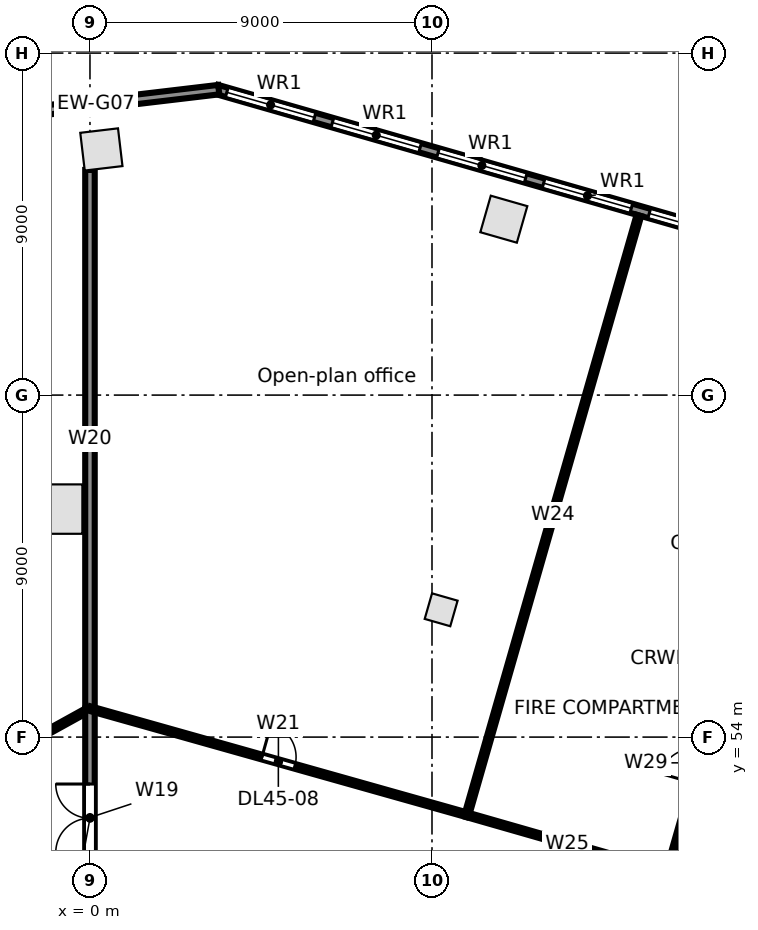
"""IFC4 building model, lengths in metres.
Left out: names, types, materials, properties, quantities, classifications, styles, units other than length and angle.
Written with IfcOpenShell. Run it as: python <this file> out.ifc"""

import sys

from ifc_helpers import new_model, si_unit, direction, frame, frame_2d, origin, origin_2d, place, context, subcontext, project, spatial, rectangle, extrude, element, fill, save


model = new_model("IFC4")
c1 = context("Model", 3, precision=1e-05, world=origin(), true_north=direction((0.0, 1.0)))
c2 = subcontext(c1, "Body", "Model", "MODEL_VIEW")
j1 = project(units=[si_unit("LENGTHUNIT", "METRE"), si_unit("PLANEANGLEUNIT", "RADIAN")], contexts=[c1])
p1 = place(None, origin())
s1 = spatial("IfcSite", under=j1, at=p1, CompositionType="ELEMENT")
p2 = place(p1, origin())
s2 = spatial("IfcBuilding", under=s1, at=p2, CompositionType="ELEMENT")
p3 = place(p2, frame((0.0, 0.0, 211.4)))
s3 = spatial("IfcBuildingStorey", under=s2, at=p3, CompositionType="ELEMENT", Elevation=211.4)
for number, where, z_axis, x_axis in (
    (1, (10.89, 67.629, 0.0), (0.0, 0.0, 1.0), (-0.961, 0.276, 0.0)),
    (2, (0.3, 69.464, 0.0), (0.0, 0.0, 1.0), (-0.993, -0.118, 0.0)),
):
    element("IfcColumn", number, at=place(p3, frame(where, z_axis=z_axis, x_axis=x_axis)), inside=s3, PredefinedType="COLUMN", context=c2, shape_type="SweptSolid", body=[
        extrude(rectangle(XDim=1.0, YDim=1.0, at=origin_2d()), origin(), (0.0, 0.0, 1.0), 3.9),
    ])
p4 = place(p3, frame((-0.85, 60.0, 0.0), z_axis=(0.0, 0.0, 1.0), x_axis=(0.0, 1.0, 0.0)))
e3 = element("IfcColumn", 3, at=p4, inside=s3, PredefinedType="COLUMN", context=c2, shape_type="SweptSolid", body=[
    extrude(rectangle(XDim=1.3, YDim=1.3, at=origin_2d()), origin(), (0.0, 0.0, 1.0), 3.9),
])
p5 = place(p3, frame((9.241, 57.35, 0.0), z_axis=(0.0, 0.0, 1.0), x_axis=(0.961261695938, -0.275637355817, 0.0)))
e4 = element("IfcColumn", 4, at=p5, inside=s3, PredefinedType="COLUMN", context=c2, shape_type="SweptSolid", body=[
    extrude(rectangle(XDim=0.7, YDim=0.7, at=origin_2d()), origin(), (0.0, 0.0, 1.0), 3.9),
])
p6 = place(p3, frame((3.34, 71.042, 0.0), z_axis=(0.0, 0.0, 1.0), x_axis=(0.96126179431, -0.275637012753, 0.0)))
e5 = element("IfcWall", 5, at=p6, inside=s3, PredefinedType="STANDARD", context=c2, shape_type="SweptSolid", body=[
    extrude(rectangle(XDim=34.779, YDim=0.25, at=frame_2d((17.39, 0.0))), origin(), (0.0, 0.0, 1.0), 3.62),
])
p7 = place(p6, frame((32.071, 0.0, 0.8)))
e6 = element("IfcOpeningElement", 6, at=p7, cuts=e5, PredefinedType="OPENING", context=c2, shape_type="SweptSolid", body=[
    extrude(rectangle(XDim=2.4, YDim=2.2, at=frame_2d((1.2, 1.1))), frame((0.0, 0.135, 0.0), z_axis=(0.0, -1.0, 0.0), x_axis=(1.0, 0.0, 0.0)), (0.0, 0.0, 1.0), 0.27),
])
p8 = place(p6, frame((29.18, 0.0, 0.8)))
e7 = element("IfcOpeningElement", 7, at=p8, cuts=e5, PredefinedType="OPENING", context=c2, shape_type="SweptSolid", body=[
    extrude(rectangle(XDim=2.4, YDim=2.2, at=frame_2d((1.2, 1.1))), frame((0.0, 0.135, 0.0), z_axis=(0.0, -1.0, 0.0), x_axis=(1.0, 0.0, 0.0)), (0.0, 0.0, 1.0), 0.27),
])
p9 = place(p6, frame((26.289, 0.0, 0.8)))
e8 = element("IfcOpeningElement", 8, at=p9, cuts=e5, PredefinedType="OPENING", context=c2, shape_type="SweptSolid", body=[
    extrude(rectangle(XDim=2.4, YDim=2.2, at=frame_2d((1.2, 1.1))), frame((0.0, 0.135, 0.0), z_axis=(0.0, -1.0, 0.0), x_axis=(1.0, 0.0, 0.0)), (0.0, 0.0, 1.0), 0.27),
])
p10 = place(p6, frame((23.398, 0.0, 0.8)))
e9 = element("IfcOpeningElement", 9, at=p10, cuts=e5, PredefinedType="OPENING", context=c2, shape_type="SweptSolid", body=[
    extrude(rectangle(XDim=2.4, YDim=2.2, at=frame_2d((1.2, 1.1))), frame((0.0, 0.135, 0.0), z_axis=(0.0, -1.0, 0.0), x_axis=(1.0, 0.0, 0.0)), (0.0, 0.0, 1.0), 0.27),
])
p11 = place(p6, frame((20.508, 0.0, 0.8)))
e10 = element("IfcOpeningElement", 10, at=p11, cuts=e5, PredefinedType="OPENING", context=c2, shape_type="SweptSolid", body=[
    extrude(rectangle(XDim=2.4, YDim=2.2, at=frame_2d((1.2, 1.1))), frame((0.0, 0.135, 0.0), z_axis=(0.0, -1.0, 0.0), x_axis=(1.0, 0.0, 0.0)), (0.0, 0.0, 1.0), 0.27),
])
p12 = place(p6, frame((17.616, 0.0, 0.8)))
e11 = element("IfcOpeningElement", 11, at=p12, cuts=e5, PredefinedType="OPENING", context=c2, shape_type="SweptSolid", body=[
    extrude(rectangle(XDim=2.4, YDim=2.2, at=frame_2d((1.2, 1.1))), frame((0.0, 0.135, 0.0), z_axis=(0.0, -1.0, 0.0), x_axis=(1.0, 0.0, 0.0)), (0.0, 0.0, 1.0), 0.27),
])
p13 = place(p6, frame((14.726, 0.0, 0.8)))
e12 = element("IfcOpeningElement", 12, at=p13, cuts=e5, PredefinedType="OPENING", context=c2, shape_type="SweptSolid", body=[
    extrude(rectangle(XDim=2.4, YDim=2.2, at=frame_2d((1.2, 1.1))), frame((0.0, 0.135, 0.0), z_axis=(0.0, -1.0, 0.0), x_axis=(1.0, 0.0, 0.0)), (0.0, 0.0, 1.0), 0.27),
])
p14 = place(p6, frame((11.834, 0.0, 0.8)))
e13 = element("IfcOpeningElement", 13, at=p14, cuts=e5, PredefinedType="OPENING", context=c2, shape_type="SweptSolid", body=[
    extrude(rectangle(XDim=2.4, YDim=2.2, at=frame_2d((1.2, 1.1))), frame((0.0, 0.135, 0.0), z_axis=(0.0, -1.0, 0.0), x_axis=(1.0, 0.0, 0.0)), (0.0, 0.0, 1.0), 0.27),
])
p15 = place(p6, frame((8.944, 0.0, 0.8)))
e14 = element("IfcOpeningElement", 14, at=p15, cuts=e5, PredefinedType="OPENING", context=c2, shape_type="SweptSolid", body=[
    extrude(rectangle(XDim=2.4, YDim=2.2, at=frame_2d((1.2, 1.1))), frame((0.0, 0.135, 0.0), z_axis=(0.0, -1.0, 0.0), x_axis=(1.0, 0.0, 0.0)), (0.0, 0.0, 1.0), 0.27),
])
p16 = place(p6, frame((6.052, 0.0, 0.8)))
e15 = element("IfcOpeningElement", 15, at=p16, cuts=e5, PredefinedType="OPENING", context=c2, shape_type="SweptSolid", body=[
    extrude(rectangle(XDim=2.4, YDim=2.2, at=frame_2d((1.2, 1.1))), frame((0.0, 0.135, 0.0), z_axis=(0.0, -1.0, 0.0), x_axis=(1.0, 0.0, 0.0)), (0.0, 0.0, 1.0), 0.27),
])
p17 = place(p6, frame((3.162, 0.0, 0.8)))
e16 = element("IfcOpeningElement", 16, at=p17, cuts=e5, PredefinedType="OPENING", context=c2, shape_type="SweptSolid", body=[
    extrude(rectangle(XDim=2.4, YDim=2.2, at=frame_2d((1.2, 1.1))), frame((0.0, 0.135, 0.0), z_axis=(0.0, -1.0, 0.0), x_axis=(1.0, 0.0, 0.0)), (0.0, 0.0, 1.0), 0.27),
])
p18 = place(p6, frame((0.271, 0.0, 0.8)))
e17 = element("IfcOpeningElement", 17, at=p18, cuts=e5, PredefinedType="OPENING", context=c2, shape_type="SweptSolid", body=[
    extrude(rectangle(XDim=2.4, YDim=2.2, at=frame_2d((1.2, 1.1))), frame((0.0, 0.135, 0.0), z_axis=(0.0, -1.0, 0.0), x_axis=(1.0, 0.0, 0.0)), (0.0, 0.0, 1.0), 0.27),
])
p19 = place(p3, frame((-3.071, 70.273, 0.0), z_axis=(0.0, 0.0, 1.0), x_axis=(0.993064524962, 0.11757061394, 0.0)))
e18 = element("IfcWall", 18, at=p19, inside=s3, PredefinedType="STANDARD", context=c2, shape_type="SweptSolid", body=[
    extrude(rectangle(XDim=6.506, YDim=0.25, at=frame_2d((3.253, 0.0))), origin(), (0.0, 0.0, 1.0), 3.62),
])
p20 = place(p3, frame((-6.053, 51.405, 0.0), z_axis=(0.0, 0.0, 1.0), x_axis=(0.875247434681, 0.483675436718, 0.0)))
e19 = element("IfcWall", 19, at=p20, inside=s3, PredefinedType="PARTITIONING", context=c2, shape_type="SweptSolid", body=[
    extrude(rectangle(XDim=6.916, YDim=0.125, at=frame_2d((3.458, 0.0))), origin(), (0.0, 0.0, 1.0), 2.8),
])
p21 = place(p20, frame((2.95, 0.0, 0.0)))
e20 = element("IfcOpeningElement", 20, at=p21, cuts=e19, PredefinedType="OPENING", context=c2, shape_type="SweptSolid", body=[
    extrude(rectangle(XDim=0.9, YDim=2.1, at=frame_2d((0.45, 1.05))), frame((0.0, 0.073, 0.0), z_axis=(0.0, -1.0, 0.0), x_axis=(1.0, 0.0, 0.0)), (0.0, 0.0, 1.0), 0.145),
])
p22 = place(p3, frame((0.0, 49.015, 0.0), z_axis=(0.0, 0.0, 1.0), x_axis=(0.0, 1.0, 0.0)))
e21 = element("IfcWall", 21, at=p22, inside=s3, PredefinedType="PARTITIONING", context=c2, shape_type="SweptSolid", body=[
    extrude(rectangle(XDim=5.735, YDim=0.25, at=frame_2d((2.868, 0.0))), origin(), (0.0, 0.0, 1.0), 3.62),
])
p23 = place(p22, frame((1.95, 0.0, 0.0)))
e22 = element("IfcOpeningElement", 22, at=p23, cuts=e21, PredefinedType="OPENING", context=c2, shape_type="SweptSolid", body=[
    extrude(rectangle(XDim=1.8, YDim=2.1, at=frame_2d((0.9, 1.05))), frame((0.0, 0.135, 0.0), z_axis=(0.0, -1.0, 0.0), x_axis=(1.0, 0.0, 0.0)), (0.0, 0.0, 1.0), 0.27),
])
p24 = place(p3, frame((0.0, 54.75, 0.0), z_axis=(0.0, 0.0, 1.0), x_axis=(0.0, 1.0, 0.0)))
e23 = element("IfcWall", 23, at=p24, inside=s3, PredefinedType="PARTITIONING", context=c2, shape_type="SweptSolid", body=[
    extrude(rectangle(XDim=14.175, YDim=0.25, at=frame_2d((7.087, 0.0))), origin(), (0.0, 0.0, 1.0), 2.8),
])
p25 = place(p3, frame((0.0, 54.75, 0.0), z_axis=(0.0, 0.0, 1.0), x_axis=(0.962504897093, -0.271264304823, 0.0)))
e24 = element("IfcWall", 24, at=p25, inside=s3, PredefinedType="PARTITIONING", context=c2, shape_type="SweptSolid", body=[
    extrude(rectangle(XDim=10.303, YDim=0.125, at=frame_2d((5.152, 0.0))), origin(), (0.0, 0.0, 1.0), 2.9),
])
p26 = place(p25, frame((4.7, 0.0, 0.0)))
e25 = element("IfcOpeningElement", 25, at=p26, cuts=e24, PredefinedType="OPENING", context=c2, shape_type="SweptSolid", body=[
    extrude(rectangle(XDim=0.9, YDim=2.1, at=frame_2d((0.45, 1.05))), frame((0.0, 0.073, 0.0), z_axis=(0.0, -1.0, 0.0), x_axis=(1.0, 0.0, 0.0)), (0.0, 0.0, 1.0), 0.145),
])
p27 = place(p3, frame((9.917, 51.955, 0.0), z_axis=(0.0, 0.0, 1.0), x_axis=(0.275933286704, 0.96117678982, 0.0)))
e26 = element("IfcWall", 26, at=p27, inside=s3, PredefinedType="PARTITIONING", context=c2, shape_type="SweptSolid", body=[
    extrude(rectangle(XDim=16.41, YDim=0.125, at=frame_2d((8.205, 0.0))), origin(), (0.0, 0.0, 1.0), 2.792),
])
p28 = place(p3, frame((9.917, 51.955, 0.0), z_axis=(0.0, 0.0, 1.0), x_axis=(0.961258850611, -0.275647278458, 0.0)))
e27 = element("IfcWall", 27, at=p28, inside=s3, PredefinedType="PARTITIONING", context=c2, shape_type="SweptSolid", body=[
    extrude(rectangle(XDim=5.5, YDim=0.125, at=frame_2d((2.75, 0.0))), origin(), (0.0, 0.0, 1.0), 2.8),
])
p29 = place(p3, frame((15.204, 50.439, 0.0), z_axis=(0.0, 0.0, 1.0), x_axis=(0.275505760599, 0.961299420512, 0.0)))
e28 = element("IfcWall", 28, at=p29, inside=s3, PredefinedType="PARTITIONING", context=c2, shape_type="SweptSolid", body=[
    extrude(rectangle(XDim=5.999, YDim=0.125, at=frame_2d((3.0, 0.0))), origin(), (0.0, 0.0, 1.0), 2.8),
])
p30 = place(p29, frame((2.45, 0.0, 0.0)))
e29 = element("IfcOpeningElement", 29, at=p30, cuts=e28, PredefinedType="OPENING", context=c2, shape_type="SweptSolid", body=[
    extrude(rectangle(XDim=0.9, YDim=2.1, at=frame_2d((0.45, 1.05))), frame((0.0, 0.073, 0.0), z_axis=(0.0, -1.0, 0.0), x_axis=(1.0, 0.0, 0.0)), (0.0, 0.0, 1.0), 0.145),
])
p31 = place(p14, origin())
e30 = element("IfcWindow", 30, at=p31, inside=s3, PartitioningType="SINGLE_PANEL", PredefinedType="WINDOW", context=c2, shape_type="SweptSolid", body=[
    extrude(rectangle(XDim=2.4, YDim=2.2, at=frame_2d((1.2, 1.1))), frame((0.0, 0.03, 0.0), z_axis=(0.0, -1.0, 0.0), x_axis=(1.0, 0.0, 0.0)), (0.0, 0.0, 1.0), 0.06),
])
fill(e13, e30)
p32 = place(p15, origin())
e31 = element("IfcWindow", 31, at=p32, inside=s3, PartitioningType="SINGLE_PANEL", PredefinedType="WINDOW", context=c2, shape_type="SweptSolid", body=[
    extrude(rectangle(XDim=2.4, YDim=2.2, at=frame_2d((1.2, 1.1))), frame((0.0, 0.03, 0.0), z_axis=(0.0, -1.0, 0.0), x_axis=(1.0, 0.0, 0.0)), (0.0, 0.0, 1.0), 0.06),
])
fill(e14, e31)
p33 = place(p16, origin())
e32 = element("IfcWindow", 32, at=p33, inside=s3, PartitioningType="SINGLE_PANEL", PredefinedType="WINDOW", context=c2, shape_type="SweptSolid", body=[
    extrude(rectangle(XDim=2.4, YDim=2.2, at=frame_2d((1.2, 1.1))), frame((0.0, 0.03, 0.0), z_axis=(0.0, -1.0, 0.0), x_axis=(1.0, 0.0, 0.0)), (0.0, 0.0, 1.0), 0.06),
])
fill(e15, e32)
p34 = place(p17, origin())
e33 = element("IfcWindow", 33, at=p34, inside=s3, PartitioningType="SINGLE_PANEL", PredefinedType="WINDOW", context=c2, shape_type="SweptSolid", body=[
    extrude(rectangle(XDim=2.4, YDim=2.2, at=frame_2d((1.2, 1.1))), frame((0.0, 0.03, 0.0), z_axis=(0.0, -1.0, 0.0), x_axis=(1.0, 0.0, 0.0)), (0.0, 0.0, 1.0), 0.06),
])
fill(e16, e33)
p35 = place(p18, origin())
e34 = element("IfcWindow", 34, at=p35, inside=s3, PartitioningType="SINGLE_PANEL", PredefinedType="WINDOW", context=c2, shape_type="SweptSolid", body=[
    extrude(rectangle(XDim=2.4, YDim=2.2, at=frame_2d((1.2, 1.1))), frame((0.0, 0.03, 0.0), z_axis=(0.0, -1.0, 0.0), x_axis=(1.0, 0.0, 0.0)), (0.0, 0.0, 1.0), 0.06),
])
fill(e17, e34)
p36 = place(p26, origin())
e35 = element("IfcDoor", 35, at=p36, inside=s3, OperationType="SINGLE_SWING_LEFT", PredefinedType="DOOR", context=c2, shape_type="SweptSolid", body=[
    extrude(rectangle(XDim=0.9, YDim=2.1, at=frame_2d((0.45, 1.05))), frame((0.0, 0.025, 0.0), z_axis=(0.0, -1.0, 0.0), x_axis=(1.0, 0.0, 0.0)), (0.0, 0.0, 1.0), 0.05),
])
fill(e25, e35)
p37 = place(p23, origin())
e36 = element("IfcDoor", 36, at=p37, inside=s3, OperationType="DOUBLE_DOOR_SINGLE_SWING", PredefinedType="DOOR", context=c2, shape_type="SweptSolid", body=[
    extrude(rectangle(XDim=1.8, YDim=2.1, at=frame_2d((0.9, 1.05))), frame((0.0, 0.025, 0.0), z_axis=(0.0, -1.0, 0.0), x_axis=(1.0, 0.0, 0.0)), (0.0, 0.0, 1.0), 0.05),
])
fill(e22, e36)
save(model, sys.argv[1])
